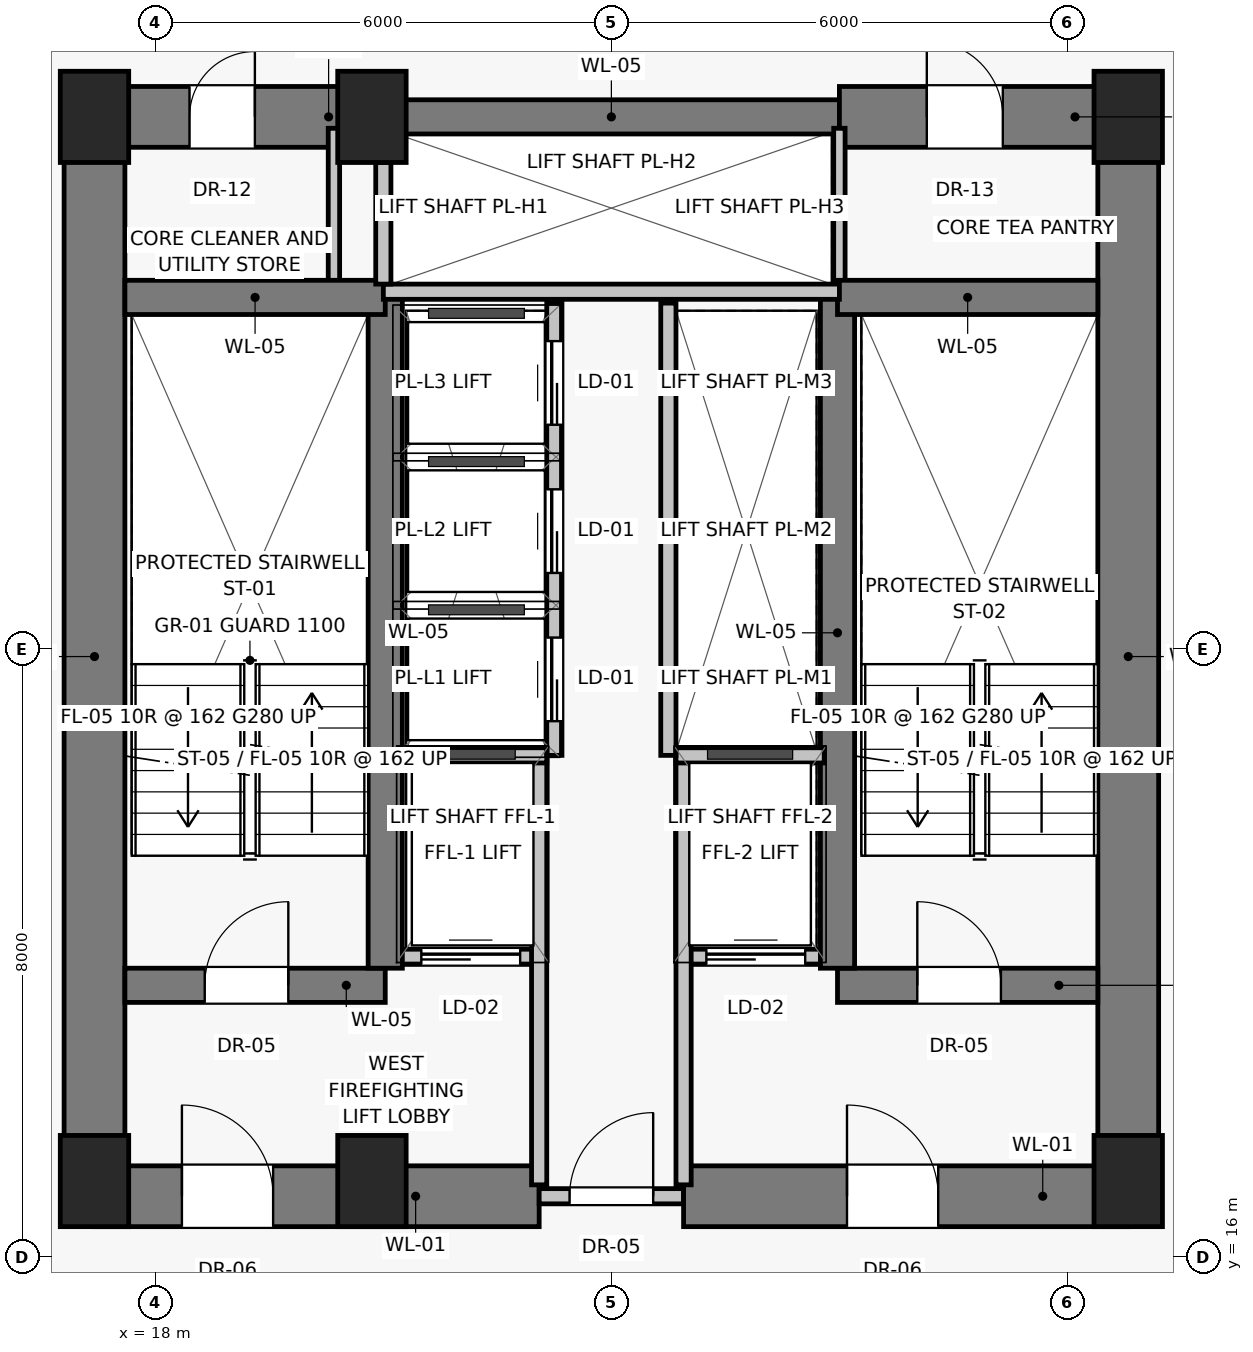
"""IFC4 building model, lengths in metres.
Left out: names, types, materials, properties, quantities, classifications, styles, units other than length and angle.
Written with IfcOpenShell. Run it as: python <this file> out.ifc"""

import sys

from ifc_helpers import new_model, si_unit, direction, frame, frame_2d, origin, origin_2d, place, context, subcontext, project, spatial, rectangle, extrude, source, transform, mapped, element, fill, save


model = new_model("IFC4")
c1 = context("Model", 3, precision=1e-05, world=origin(), true_north=direction((0.0, 1.0)))
c2 = subcontext(c1, "Body", "Model", "MODEL_VIEW")
j1 = project(units=[si_unit("LENGTHUNIT", "METRE"), si_unit("PLANEANGLEUNIT", "RADIAN")], contexts=[c1])
p1 = place(None, origin())
s1 = spatial("IfcSite", under=j1, at=p1, CompositionType="ELEMENT")
p2 = place(p1, origin())
s2 = spatial("IfcBuilding", under=s1, at=p2, CompositionType="ELEMENT")
p3 = place(p2, frame((0.0, 0.0, 60.85)))
s3 = spatial("IfcBuildingStorey", under=s2, at=p3, CompositionType="ELEMENT", Elevation=60.85)
for number, where, z_axis, x_axis in (
    (1, (17.2, 17.0, 0.0), (0.0, 0.0, 1.0), (1.0, 0.0, 0.0)),
    (2, (20.85, 17.0, 0.0), (0.0, 0.0, 1.0), (1.0, 0.0, 0.0)),
    (3, (30.8, 17.0, 0.0), (0.0, 0.0, 1.0), (1.0, 0.0, 0.0)),
    (4, (17.2, 31.0, 0.0), (0.0, 0.0, 1.0), (1.0, 0.0, 0.0)),
    (5, (20.85, 31.0, 0.0), (0.0, 0.0, 1.0), (1.0, 0.0, 0.0)),
    (6, (30.8, 31.0, 0.0), (0.0, 0.0, 1.0), (1.0, 0.0, 0.0)),
):
    element("IfcColumn", number, at=place(p3, frame(where, z_axis=z_axis, x_axis=x_axis)), inside=s3, PredefinedType="PILASTER", context=c2, shape_type="SweptSolid", body=[
        extrude(rectangle(XDim=0.9, YDim=1.2, at=origin_2d()), origin(), (0.0, 0.0, 1.0), 3.25),
    ])
for number, where, z_axis, x_axis in (
    (7, (17.2, 16.8, 0.0), (0.0, 0.0, 1.0), (0.0, 1.0, 0.0)),
    (8, (30.8, 16.8, 0.0), (0.0, 0.0, 1.0), (0.0, 1.0, 0.0)),
):
    element("IfcWall", number, at=place(p3, frame(where, z_axis=z_axis, x_axis=x_axis)), inside=s3, PredefinedType="SHEAR", context=c2, shape_type="SweptSolid", body=[
        extrude(rectangle(XDim=14.2, YDim=0.8, at=frame_2d((7.1, 0.0))), origin(), (0.0, 0.0, 1.0), 3.0),
    ])
p4 = place(p3, frame((17.2, 16.8, 0.0), z_axis=(0.0, 0.0, 1.0), x_axis=(1.0, 0.0, 0.0)))
e9 = element("IfcWall", 9, at=p4, inside=s3, PredefinedType="SHEAR", context=c2, shape_type="SweptSolid", body=[
    extrude(rectangle(XDim=5.85, YDim=0.8, at=frame_2d((2.925, 0.0))), origin(), (0.0, 0.0, 1.0), 3.0),
])
p5 = place(p4, frame((1.15, 0.0, 0.0)))
e10 = element("IfcOpeningElement", 10, at=p5, cuts=e9, PredefinedType="OPENING", context=c2, shape_type="SweptSolid", body=[
    extrude(rectangle(XDim=1.2, YDim=2.03, at=frame_2d((0.6, 1.015))), frame((0.0, 0.41, 0.0), z_axis=(0.0, -1.0, 0.0), x_axis=(1.0, 0.0, 0.0)), (0.0, 0.0, 1.0), 0.82),
])
p6 = place(p3, frame((23.05, 16.8, 0.0), z_axis=(0.0, 0.0, 1.0), x_axis=(1.0, 0.0, 0.0)))
e11 = element("IfcWall", 11, at=p6, inside=s3, PredefinedType="SOLIDWALL", context=c2, shape_type="SweptSolid", body=[
    extrude(rectangle(XDim=1.9, YDim=0.2, at=frame_2d((0.95, 0.0))), origin(), (0.0, 0.0, 1.0), 2.15),
])
p7 = place(p6, frame((0.4, 0.0, 0.0)))
e12 = element("IfcOpeningElement", 12, at=p7, cuts=e11, PredefinedType="OPENING", context=c2, shape_type="SweptSolid", body=[
    extrude(rectangle(XDim=1.1, YDim=2.03, at=frame_2d((0.55, 1.015))), frame((0.0, 0.11, 0.0), z_axis=(0.0, -1.0, 0.0), x_axis=(1.0, 0.0, 0.0)), (0.0, 0.0, 1.0), 0.22),
])
p8 = place(p3, frame((24.95, 16.8, 0.0), z_axis=(0.0, 0.0, 1.0), x_axis=(1.0, 0.0, 0.0)))
e13 = element("IfcWall", 13, at=p8, inside=s3, PredefinedType="SHEAR", context=c2, shape_type="SweptSolid", body=[
    extrude(rectangle(XDim=5.85, YDim=0.8, at=frame_2d((2.925, 0.0))), origin(), (0.0, 0.0, 1.0), 3.0),
])
p9 = place(p8, frame((2.15, 0.0, 0.0)))
e14 = element("IfcOpeningElement", 14, at=p9, cuts=e13, PredefinedType="OPENING", context=c2, shape_type="SweptSolid", body=[
    extrude(rectangle(XDim=1.2, YDim=2.03, at=frame_2d((0.6, 1.015))), frame((0.0, 0.41, 0.0), z_axis=(0.0, -1.0, 0.0), x_axis=(1.0, 0.0, 0.0)), (0.0, 0.0, 1.0), 0.82),
])
p10 = place(p3, frame((17.2, 31.0, 0.0), z_axis=(0.0, 0.0, 1.0), x_axis=(1.0, 0.0, 0.0)))
e15 = element("IfcWall", 15, at=p10, inside=s3, PredefinedType="SHEAR", context=c2, shape_type="SweptSolid", body=[
    extrude(rectangle(XDim=3.8, YDim=0.8, at=frame_2d((1.9, 0.0))), origin(), (0.0, 0.0, 1.0), 3.0),
])
p11 = place(p10, frame((1.25, 0.0, 0.0)))
e16 = element("IfcOpeningElement", 16, at=p11, cuts=e15, PredefinedType="OPENING", context=c2, shape_type="SweptSolid", body=[
    extrude(rectangle(XDim=0.86, YDim=2.01, at=frame_2d((0.43, 1.005))), frame((0.0, 0.41, 0.0), z_axis=(0.0, -1.0, 0.0), x_axis=(1.0, 0.0, 0.0)), (0.0, 0.0, 1.0), 0.82),
])
p12 = place(p3, frame((21.0, 31.0, 0.0), z_axis=(0.0, 0.0, 1.0), x_axis=(1.0, 0.0, 0.0)))
e17 = element("IfcWall", 17, at=p12, inside=s3, PredefinedType="SHEAR", context=c2, shape_type="SweptSolid", body=[
    extrude(rectangle(XDim=6.0, YDim=0.45, at=frame_2d((3.0, 0.0))), origin(), (0.0, 0.0, 1.0), 3.0),
])
p13 = place(p3, frame((27.0, 31.0, 0.0), z_axis=(0.0, 0.0, 1.0), x_axis=(1.0, 0.0, 0.0)))
e18 = element("IfcWall", 18, at=p13, inside=s3, PredefinedType="SHEAR", context=c2, shape_type="SweptSolid", body=[
    extrude(rectangle(XDim=3.8, YDim=0.8, at=frame_2d((1.9, 0.0))), origin(), (0.0, 0.0, 1.0), 3.0),
])
p14 = place(p13, frame((1.15, 0.0, 0.0)))
e19 = element("IfcOpeningElement", 19, at=p14, cuts=e18, PredefinedType="OPENING", context=c2, shape_type="SweptSolid", body=[
    extrude(rectangle(XDim=1.0, YDim=2.01, at=frame_2d((0.5, 1.005))), frame((0.0, 0.41, 0.0), z_axis=(0.0, -1.0, 0.0), x_axis=(1.0, 0.0, 0.0)), (0.0, 0.0, 1.0), 0.82),
])
for number, where, z_axis, x_axis in (
    (20, (20.35, 28.65, 0.0), (0.0, 0.0, 1.0), (0.0, 1.0, 0.0)),
    (21, (27.0, 28.65, 0.0), (0.0, 0.0, 1.0), (0.0, 1.0, 0.0)),
):
    element("IfcWall", number, at=place(p3, frame(where, z_axis=z_axis, x_axis=x_axis)), inside=s3, PredefinedType="PARTITIONING", context=c2, shape_type="SweptSolid", body=[
        extrude(rectangle(XDim=2.2, YDim=0.15, at=frame_2d((1.1, 0.0))), origin(), (0.0, 0.0, 1.0), 3.0),
    ])
p15 = place(p3, frame((17.6, 19.575, 0.0), z_axis=(0.0, 0.0, 1.0), x_axis=(1.0, 0.0, 0.0)))
e22 = element("IfcWall", 22, at=p15, inside=s3, PredefinedType="SHEAR", context=c2, shape_type="SweptSolid", body=[
    extrude(rectangle(XDim=3.425, YDim=0.45, at=frame_2d((1.712, 0.0))), origin(), (0.0, 0.0, 1.0), 3.0),
])
p16 = place(p15, frame((1.05, 0.0, 0.0)))
e23 = element("IfcOpeningElement", 23, at=p16, cuts=e22, PredefinedType="OPENING", context=c2, shape_type="SweptSolid", body=[
    extrude(rectangle(XDim=1.1, YDim=2.03, at=frame_2d((0.55, 1.015))), frame((0.0, 0.235, 0.0), z_axis=(0.0, -1.0, 0.0), x_axis=(1.0, 0.0, 0.0)), (0.0, 0.0, 1.0), 0.47),
])
p17 = place(p3, frame((21.2, 19.95, 0.0), z_axis=(0.0, 0.0, 1.0), x_axis=(1.0, 0.0, 0.0)))
e24 = element("IfcWall", 24, at=p17, inside=s3, PredefinedType="SOLIDWALL", context=c2, shape_type="SweptSolid", body=[
    extrude(rectangle(XDim=1.85, YDim=0.2, at=frame_2d((0.925, 0.0))), origin(), (0.0, 0.0, 1.0), 3.0),
])
p18 = place(p17, frame((0.3, 0.0, 0.0)))
e25 = element("IfcOpeningElement", 25, at=p18, cuts=e24, PredefinedType="OPENING", context=c2, shape_type="SweptSolid", body=[
    extrude(rectangle(XDim=1.3, YDim=2.25, at=frame_2d((0.65, 1.125))), frame((0.0, 0.11, 0.0), z_axis=(0.0, -1.0, 0.0), x_axis=(1.0, 0.0, 0.0)), (0.0, 0.0, 1.0), 0.22),
])
p19 = place(p3, frame((24.95, 19.95, 0.0), z_axis=(0.0, 0.0, 1.0), x_axis=(1.0, 0.0, 0.0)))
e26 = element("IfcWall", 26, at=p19, inside=s3, PredefinedType="SOLIDWALL", context=c2, shape_type="SweptSolid", body=[
    extrude(rectangle(XDim=1.85, YDim=0.2, at=frame_2d((0.925, 0.0))), origin(), (0.0, 0.0, 1.0), 3.0),
])
p20 = place(p19, frame((0.3, 0.0, 0.0)))
e27 = element("IfcOpeningElement", 27, at=p20, cuts=e26, PredefinedType="OPENING", context=c2, shape_type="SweptSolid", body=[
    extrude(rectangle(XDim=1.3, YDim=2.25, at=frame_2d((0.65, 1.125))), frame((0.0, 0.11, 0.0), z_axis=(0.0, -1.0, 0.0), x_axis=(1.0, 0.0, 0.0)), (0.0, 0.0, 1.0), 0.22),
])
p21 = place(p3, frame((26.975, 19.575, 0.0), z_axis=(0.0, 0.0, 1.0), x_axis=(1.0, 0.0, 0.0)))
e28 = element("IfcWall", 28, at=p21, inside=s3, PredefinedType="SHEAR", context=c2, shape_type="SweptSolid", body=[
    extrude(rectangle(XDim=3.425, YDim=0.45, at=frame_2d((1.712, 0.0))), origin(), (0.0, 0.0, 1.0), 3.0),
])
p22 = place(p21, frame((1.05, 0.0, 0.0)))
e29 = element("IfcOpeningElement", 29, at=p22, cuts=e28, PredefinedType="OPENING", context=c2, shape_type="SweptSolid", body=[
    extrude(rectangle(XDim=1.1, YDim=2.03, at=frame_2d((0.55, 1.015))), frame((0.0, 0.235, 0.0), z_axis=(0.0, -1.0, 0.0), x_axis=(1.0, 0.0, 0.0)), (0.0, 0.0, 1.0), 0.47),
])
for number, where, z_axis, x_axis in (
    (30, (21.025, 19.8, 0.0), (0.0, 0.0, 1.0), (0.0, 1.0, 0.0)),
    (31, (26.975, 19.8, 0.0), (0.0, 0.0, 1.0), (0.0, 1.0, 0.0)),
):
    element("IfcWall", number, at=place(p3, frame(where, z_axis=z_axis, x_axis=x_axis)), inside=s3, PredefinedType="SHEAR", context=c2, shape_type="SweptSolid", body=[
        extrude(rectangle(XDim=8.825, YDim=0.45, at=frame_2d((4.413, 0.0))), origin(), (0.0, 0.0, 1.0), 3.0),
    ])
for number, where, z_axis, x_axis in (
    (32, (17.6, 28.625, 0.0), (0.0, 0.0, 1.0), (1.0, 0.0, 0.0)),
    (33, (26.975, 28.625, 0.0), (0.0, 0.0, 1.0), (1.0, 0.0, 0.0)),
):
    element("IfcWall", number, at=place(p3, frame(where, z_axis=z_axis, x_axis=x_axis)), inside=s3, PredefinedType="SHEAR", context=c2, shape_type="SweptSolid", body=[
        extrude(rectangle(XDim=3.425, YDim=0.45, at=frame_2d((1.712, 0.0))), origin(), (0.0, 0.0, 1.0), 3.0),
    ])
for number, where, z_axis, x_axis in (
    (34, (23.05, 16.95, 0.0), (0.0, 0.0, 1.0), (0.0, 1.0, 0.0)),
    (35, (24.95, 16.95, 0.0), (0.0, 0.0, 1.0), (0.0, 1.0, 0.0)),
):
    element("IfcWall", number, at=place(p3, frame(where, z_axis=z_axis, x_axis=x_axis)), inside=s3, PredefinedType="SOLIDWALL", context=c2, shape_type="SweptSolid", body=[
        extrude(rectangle(XDim=5.6, YDim=0.2, at=frame_2d((2.8, 0.0))), origin(), (0.0, 0.0, 1.0), 3.0),
    ])
for number, where, z_axis, x_axis in (
    (36, (21.2, 22.6, 0.0), (0.0, 0.0, 1.0), (1.0, 0.0, 0.0)),
    (37, (24.85, 22.6, 0.0), (0.0, 0.0, 1.0), (1.0, 0.0, 0.0)),
):
    element("IfcWall", number, at=place(p3, frame(where, z_axis=z_axis, x_axis=x_axis)), inside=s3, PredefinedType="SOLIDWALL", context=c2, shape_type="SweptSolid", body=[
        extrude(rectangle(XDim=1.95, YDim=0.2, at=frame_2d((0.975, 0.0))), origin(), (0.0, 0.0, 1.0), 3.0),
    ])
p23 = place(p3, frame((21.0, 28.7, 0.0), z_axis=(0.0, 0.0, 1.0), x_axis=(1.0, 0.0, 0.0)))
e38 = element("IfcWall", 38, at=p23, inside=s3, PredefinedType="SOLIDWALL", context=c2, shape_type="SweptSolid", body=[
    extrude(rectangle(XDim=6.0, YDim=0.2, at=frame_2d((3.0, 0.0))), origin(), (0.0, 0.0, 1.0), 3.0),
])
p24 = place(p3, frame((21.0, 28.8, 0.0), z_axis=(0.0, 0.0, 1.0), x_axis=(0.0, 1.0, 0.0)))
e39 = element("IfcWall", 39, at=p24, inside=s3, PredefinedType="SOLIDWALL", context=c2, shape_type="SweptSolid", body=[
    extrude(rectangle(XDim=1.6, YDim=0.2, at=frame_2d((0.8, 0.0))), origin(), (0.0, 0.0, 1.0), 3.0),
])
p25 = place(p3, frame((23.25, 22.6, 0.0), z_axis=(0.0, 0.0, 1.0), x_axis=(0.0, 1.0, 0.0)))
e40 = element("IfcWall", 40, at=p25, inside=s3, PredefinedType="SOLIDWALL", context=c2, shape_type="SweptSolid", body=[
    extrude(rectangle(XDim=5.95, YDim=0.2, at=frame_2d((2.975, 0.0))), origin(), (0.0, 0.0, 1.0), 3.0),
])
p26 = place(p25, frame((0.45, 0.0, 0.0)))
e41 = element("IfcOpeningElement", 41, at=p26, cuts=e40, PredefinedType="OPENING", context=c2, shape_type="SweptSolid", body=[
    extrude(rectangle(XDim=1.1, YDim=2.08, at=frame_2d((0.55, 1.04))), frame((0.0, 0.11, 0.0), z_axis=(0.0, -1.0, 0.0), x_axis=(1.0, 0.0, 0.0)), (0.0, 0.0, 1.0), 0.22),
])
p27 = place(p25, frame((2.4, 0.0, 0.0)))
e42 = element("IfcOpeningElement", 42, at=p27, cuts=e40, PredefinedType="OPENING", context=c2, shape_type="SweptSolid", body=[
    extrude(rectangle(XDim=1.1, YDim=2.08, at=frame_2d((0.55, 1.04))), frame((0.0, 0.11, 0.0), z_axis=(0.0, -1.0, 0.0), x_axis=(1.0, 0.0, 0.0)), (0.0, 0.0, 1.0), 0.22),
])
p28 = place(p25, frame((4.35, 0.0, 0.0)))
e43 = element("IfcOpeningElement", 43, at=p28, cuts=e40, PredefinedType="OPENING", context=c2, shape_type="SweptSolid", body=[
    extrude(rectangle(XDim=1.1, YDim=2.08, at=frame_2d((0.55, 1.04))), frame((0.0, 0.11, 0.0), z_axis=(0.0, -1.0, 0.0), x_axis=(1.0, 0.0, 0.0)), (0.0, 0.0, 1.0), 0.22),
])
p29 = place(p3, frame((24.75, 22.6, 0.0), z_axis=(0.0, 0.0, 1.0), x_axis=(0.0, 1.0, 0.0)))
e44 = element("IfcWall", 44, at=p29, inside=s3, PredefinedType="SOLIDWALL", context=c2, shape_type="SweptSolid", body=[
    extrude(rectangle(XDim=5.95, YDim=0.2, at=frame_2d((2.975, 0.0))), origin(), (0.0, 0.0, 1.0), 3.0),
])
m1 = source(origin(), c2, "Body", "SweptSolid", [
    extrude(rectangle(XDim=1.2, YDim=2.03, at=frame_2d((0.6, 1.015))), frame((0.0, 0.025, 0.0), z_axis=(0.0, -1.0, 0.0), x_axis=(1.0, 0.0, 0.0)), (0.0, 0.0, 1.0), 0.05),
])
p30 = place(p5, origin())
e45 = element("IfcDoor", 45, at=p30, inside=s3, OperationType="SINGLE_SWING_LEFT", PredefinedType="DOOR", context=c2, shape_type="MappedRepresentation", body=[
    mapped(m1, transform((0.0, 0.0, 0.0), scale=1.0)),
])
fill(e10, e45)
m2 = source(origin(), c2, "Body", "SweptSolid", [
    extrude(rectangle(XDim=1.1, YDim=2.03, at=frame_2d((0.55, 1.015))), frame((0.0, 0.025, 0.0), z_axis=(0.0, -1.0, 0.0), x_axis=(1.0, 0.0, 0.0)), (0.0, 0.0, 1.0), 0.05),
])
p31 = place(p7, origin())
e46 = element("IfcDoor", 46, at=p31, inside=s3, OperationType="SINGLE_SWING_RIGHT", PredefinedType="DOOR", context=c2, shape_type="MappedRepresentation", body=[
    mapped(m2, transform((0.0, 0.0, 0.0), scale=1.0)),
])
fill(e12, e46)
p32 = place(p9, origin())
e47 = element("IfcDoor", 47, at=p32, inside=s3, OperationType="SINGLE_SWING_LEFT", PredefinedType="DOOR", context=c2, shape_type="MappedRepresentation", body=[
    mapped(m1, transform((0.0, 0.0, 0.0), scale=1.0)),
])
fill(e14, e47)
m3 = source(origin(), c2, "Body", "SweptSolid", [
    extrude(rectangle(XDim=0.86, YDim=2.01, at=frame_2d((0.43, 1.005))), frame((0.0, 0.025, 0.0), z_axis=(0.0, -1.0, 0.0), x_axis=(1.0, 0.0, 0.0)), (0.0, 0.0, 1.0), 0.05),
])
p33 = place(p11, origin())
e48 = element("IfcDoor", 48, at=p33, inside=s3, OperationType="SINGLE_SWING_RIGHT", PredefinedType="DOOR", context=c2, shape_type="MappedRepresentation", body=[
    mapped(m3, transform((0.0, 0.0, 0.0), scale=1.0)),
])
fill(e16, e48)
m4 = source(origin(), c2, "Body", "SweptSolid", [
    extrude(rectangle(XDim=1.0, YDim=2.01, at=frame_2d((0.5, 1.005))), frame((0.0, 0.025, 0.0), z_axis=(0.0, -1.0, 0.0), x_axis=(1.0, 0.0, 0.0)), (0.0, 0.0, 1.0), 0.05),
])
p34 = place(p14, origin())
e49 = element("IfcDoor", 49, at=p34, inside=s3, OperationType="SINGLE_SWING_LEFT", PredefinedType="DOOR", context=c2, shape_type="MappedRepresentation", body=[
    mapped(m4, transform((0.0, 0.0, 0.0), scale=1.0)),
])
fill(e19, e49)
p35 = place(p16, origin())
e50 = element("IfcDoor", 50, at=p35, inside=s3, OperationType="SINGLE_SWING_RIGHT", PredefinedType="DOOR", context=c2, shape_type="MappedRepresentation", body=[
    mapped(m2, transform((0.0, 0.0, 0.0), scale=1.0)),
])
fill(e23, e50)
m5 = source(origin(), c2, "Body", "SweptSolid", [
    extrude(rectangle(XDim=1.3, YDim=2.25, at=frame_2d((0.65, 1.125))), frame((0.0, 0.025, 0.0), z_axis=(0.0, -1.0, 0.0), x_axis=(1.0, 0.0, 0.0)), (0.0, 0.0, 1.0), 0.05),
])
p36 = place(p18, origin())
e51 = element("IfcDoor", 51, at=p36, inside=s3, OperationType="SLIDING_TO_LEFT", PredefinedType="DOOR", context=c2, shape_type="MappedRepresentation", body=[
    mapped(m5, transform((0.0, 0.0, 0.0), scale=1.0)),
])
fill(e25, e51)
p37 = place(p20, origin())
e52 = element("IfcDoor", 52, at=p37, inside=s3, OperationType="SLIDING_TO_LEFT", PredefinedType="DOOR", context=c2, shape_type="MappedRepresentation", body=[
    mapped(m5, transform((0.0, 0.0, 0.0), scale=1.0)),
])
fill(e27, e52)
p38 = place(p22, origin())
e53 = element("IfcDoor", 53, at=p38, inside=s3, OperationType="SINGLE_SWING_LEFT", PredefinedType="DOOR", context=c2, shape_type="MappedRepresentation", body=[
    mapped(m2, transform((0.0, 0.0, 0.0), scale=1.0)),
])
fill(e29, e53)
m6 = source(origin(), c2, "Body", "SweptSolid", [
    extrude(rectangle(XDim=1.1, YDim=2.08, at=frame_2d((0.55, 1.04))), frame((0.0, 0.025, 0.0), z_axis=(0.0, -1.0, 0.0), x_axis=(1.0, 0.0, 0.0)), (0.0, 0.0, 1.0), 0.05),
])
p39 = place(p26, origin())
e54 = element("IfcDoor", 54, at=p39, inside=s3, OperationType="SLIDING_TO_LEFT", PredefinedType="DOOR", context=c2, shape_type="MappedRepresentation", body=[
    mapped(m6, transform((0.0, 0.0, 0.0), scale=1.0)),
])
fill(e41, e54)
p40 = place(p27, origin())
e55 = element("IfcDoor", 55, at=p40, inside=s3, OperationType="SLIDING_TO_LEFT", PredefinedType="DOOR", context=c2, shape_type="MappedRepresentation", body=[
    mapped(m6, transform((0.0, 0.0, 0.0), scale=1.0)),
])
fill(e42, e55)
p41 = place(p28, origin())
e56 = element("IfcDoor", 56, at=p41, inside=s3, OperationType="SLIDING_TO_LEFT", PredefinedType="DOOR", context=c2, shape_type="MappedRepresentation", body=[
    mapped(m6, transform((0.0, 0.0, 0.0), scale=1.0)),
])
fill(e43, e56)
save(model, sys.argv[1])
